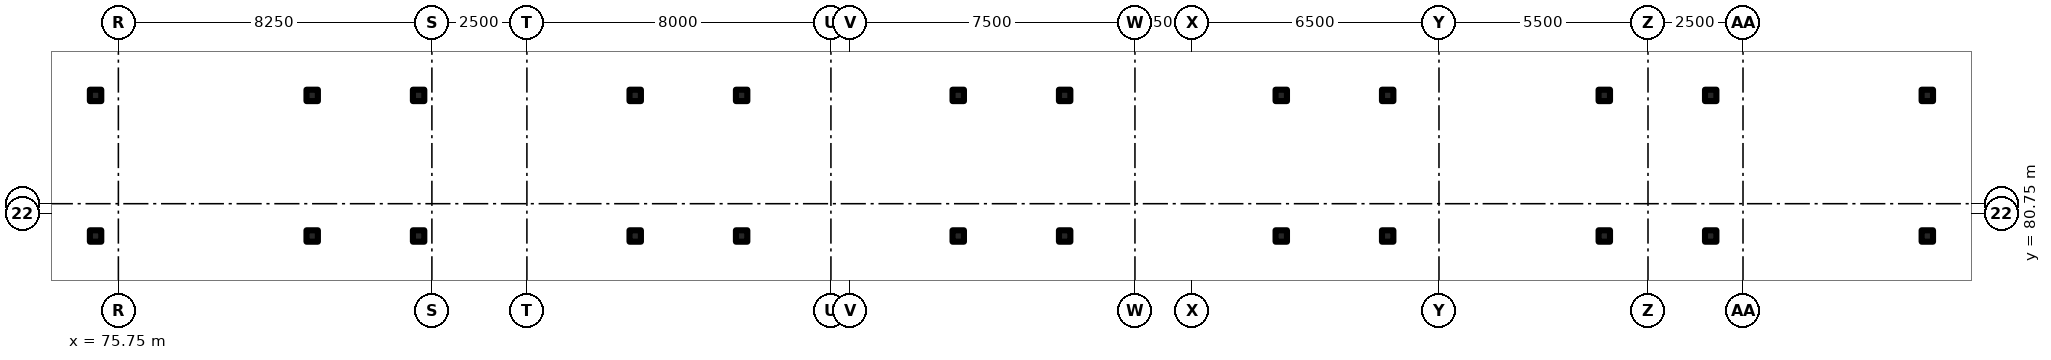
"""IFC4 building model, lengths in metres.
Left out: names, types, materials, properties, quantities, classifications, styles, units other than length and angle.
Written with IfcOpenShell. Run it as: python <this file> out.ifc"""

import sys

from ifc_helpers import new_model, si_unit, direction, frame, origin, origin_2d, place, context, subcontext, project, spatial, rectangle, extrude, element, save


model = new_model("IFC4")
c1 = context("Model", 3, precision=1e-05, world=origin(), true_north=direction((0.0, 1.0)))
c2 = subcontext(c1, "Body", "Model", "MODEL_VIEW")
j1 = project(units=[si_unit("LENGTHUNIT", "METRE"), si_unit("PLANEANGLEUNIT", "RADIAN")], contexts=[c1])
p1 = place(None, origin())
s1 = spatial("IfcSite", under=j1, at=p1, CompositionType="ELEMENT")
p2 = place(p1, origin())
s2 = spatial("IfcBuilding", under=s1, at=p2, CompositionType="ELEMENT")
p3 = place(p2, origin())
s3 = spatial("IfcBuildingStorey", under=s2, at=p3, CompositionType="ELEMENT", Elevation=0.0)
for number, where, z_axis, x_axis in (
    (1, (75.15, 80.15, -0.3), (0.0, 0.0, 1.0), (1.0, 0.0, 0.0)),
    (2, (80.85, 80.15, -0.3), (0.0, 0.0, 1.0), (1.0, 0.0, 0.0)),
    (3, (75.15, 83.85, -0.3), (0.0, 0.0, 1.0), (1.0, 0.0, 0.0)),
    (4, (80.85, 83.85, -0.3), (0.0, 0.0, 1.0), (1.0, 0.0, 0.0)),
    (5, (83.65, 80.15, -0.3), (0.0, 0.0, 1.0), (1.0, 0.0, 0.0)),
    (6, (89.35, 80.15, -0.3), (0.0, 0.0, 1.0), (1.0, 0.0, 0.0)),
    (7, (83.65, 83.85, -0.3), (0.0, 0.0, 1.0), (1.0, 0.0, 0.0)),
    (8, (89.35, 83.85, -0.3), (0.0, 0.0, 1.0), (1.0, 0.0, 0.0)),
    (9, (92.15, 80.15, -0.3), (0.0, 0.0, 1.0), (1.0, 0.0, 0.0)),
    (10, (97.85, 80.15, -0.3), (0.0, 0.0, 1.0), (1.0, 0.0, 0.0)),
    (11, (92.15, 83.85, -0.3), (0.0, 0.0, 1.0), (1.0, 0.0, 0.0)),
    (12, (97.85, 83.85, -0.3), (0.0, 0.0, 1.0), (1.0, 0.0, 0.0)),
    (13, (100.65, 80.15, -0.3), (0.0, 0.0, 1.0), (1.0, 0.0, 0.0)),
    (14, (106.35, 80.15, -0.3), (0.0, 0.0, 1.0), (1.0, 0.0, 0.0)),
    (15, (100.65, 83.85, -0.3), (0.0, 0.0, 1.0), (1.0, 0.0, 0.0)),
    (16, (106.35, 83.85, -0.3), (0.0, 0.0, 1.0), (1.0, 0.0, 0.0)),
    (17, (109.15, 80.15, -0.3), (0.0, 0.0, 1.0), (1.0, 0.0, 0.0)),
    (18, (114.85, 80.15, -0.3), (0.0, 0.0, 1.0), (1.0, 0.0, 0.0)),
    (19, (109.15, 83.85, -0.3), (0.0, 0.0, 1.0), (1.0, 0.0, 0.0)),
    (20, (114.85, 83.85, -0.3), (0.0, 0.0, 1.0), (1.0, 0.0, 0.0)),
    (21, (117.65, 80.15, -0.3), (0.0, 0.0, 1.0), (1.0, 0.0, 0.0)),
    (22, (123.35, 80.15, -0.3), (0.0, 0.0, 1.0), (1.0, 0.0, 0.0)),
    (23, (117.65, 83.85, -0.3), (0.0, 0.0, 1.0), (1.0, 0.0, 0.0)),
    (24, (123.35, 83.85, -0.3), (0.0, 0.0, 1.0), (1.0, 0.0, 0.0)),
):
    element("IfcColumn", number, at=place(p3, frame(where, z_axis=z_axis, x_axis=x_axis)), inside=s3, PredefinedType="COLUMN", context=c2, shape_type="SweptSolid", body=[
        extrude(rectangle(XDim=0.3, YDim=0.3, at=origin_2d()), origin(), (0.0, 0.0, 1.0), 3.65),
    ])
save(model, sys.argv[1])
